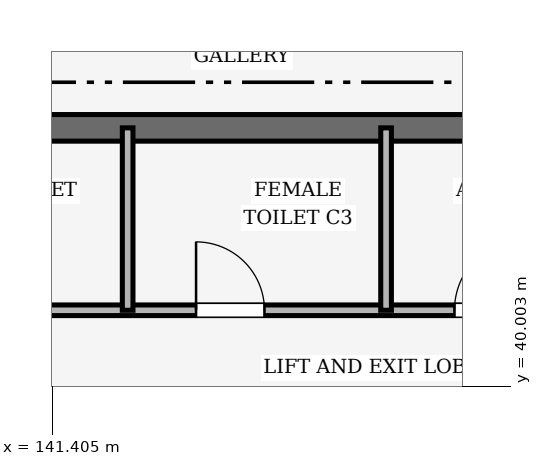
"""IFC4 building model, lengths in metres.
Left out: names, types, materials, properties, quantities, classifications, styles, units other than length and angle.
Written with IfcOpenShell. Run it as: python <this file> out.ifc"""

import sys

from ifc_helpers import new_model, si_unit, direction, frame, frame_2d, origin, place, context, subcontext, project, spatial, rectangle, extrude, element, fill, save


model = new_model("IFC4")
c1 = context("Model", 3, precision=1e-05, world=origin(), true_north=direction((0.0, 1.0)))
c2 = subcontext(c1, "Body", "Model", "MODEL_VIEW")
j1 = project(units=[si_unit("LENGTHUNIT", "METRE"), si_unit("PLANEANGLEUNIT", "RADIAN")], contexts=[c1])
p1 = place(None, origin())
s1 = spatial("IfcSite", under=j1, at=p1, CompositionType="ELEMENT")
p2 = place(p1, origin())
s2 = spatial("IfcBuilding", under=s1, at=p2, CompositionType="ELEMENT")
p3 = place(p2, origin())
s3 = spatial("IfcBuildingStorey", under=s2, at=p3, CompositionType="ELEMENT", Elevation=0.0)
p4 = place(p3, frame((149.2, 43.4, 0.0), z_axis=(0.0, 0.0, 1.0), x_axis=(-1.0, 0.0, 0.0)))
e1 = element("IfcWall", 1, at=p4, inside=s3, PredefinedType="SHEAR", context=c2, shape_type="SweptSolid", body=[
    extrude(rectangle(XDim=10.2, YDim=0.35, at=frame_2d((5.1, 0.0))), origin(), (0.0, 0.0, 1.0), 5.4),
])
p5 = place(p3, frame((139.0, 41.0, 0.0), z_axis=(0.0, 0.0, 1.0), x_axis=(1.0, 0.0, 0.0)))
e2 = element("IfcWall", 2, at=p5, inside=s3, PredefinedType="PARTITIONING", context=c2, shape_type="SweptSolid", body=[
    extrude(rectangle(XDim=10.2, YDim=0.14, at=frame_2d((5.1, 0.0))), origin(), (0.0, 0.0, 1.0), 4.5),
])
p6 = place(p5, frame((0.9, 0.0, 0.0)))
e3 = element("IfcOpeningElement", 3, at=p6, cuts=e2, PredefinedType="OPENING", context=c2, shape_type="SweptSolid", body=[
    extrude(rectangle(XDim=0.9, YDim=2.1, at=frame_2d((0.45, 1.05))), frame((0.0, 0.08, 0.0), z_axis=(0.0, -1.0, 0.0), x_axis=(1.0, 0.0, 0.0)), (0.0, 0.0, 1.0), 0.16),
])
p7 = place(p5, frame((4.3, 0.0, 0.0)))
e4 = element("IfcOpeningElement", 4, at=p7, cuts=e2, PredefinedType="OPENING", context=c2, shape_type="SweptSolid", body=[
    extrude(rectangle(XDim=0.9, YDim=2.1, at=frame_2d((0.45, 1.05))), frame((0.0, 0.08, 0.0), z_axis=(0.0, -1.0, 0.0), x_axis=(1.0, 0.0, 0.0)), (0.0, 0.0, 1.0), 0.16),
])
p8 = place(p5, frame((7.7, 0.0, 0.0)))
e5 = element("IfcOpeningElement", 5, at=p8, cuts=e2, PredefinedType="OPENING", context=c2, shape_type="SweptSolid", body=[
    extrude(rectangle(XDim=0.95, YDim=2.1, at=frame_2d((0.475, 1.05))), frame((0.0, 0.08, 0.0), z_axis=(0.0, -1.0, 0.0), x_axis=(1.0, 0.0, 0.0)), (0.0, 0.0, 1.0), 0.16),
])
for number, where, z_axis, x_axis in (
    (6, (142.4, 41.0, 0.0), (0.0, 0.0, 1.0), (0.0, 1.0, 0.0)),
    (7, (145.8, 41.0, 0.0), (0.0, 0.0, 1.0), (0.0, 1.0, 0.0)),
):
    element("IfcWall", number, at=place(p3, frame(where, z_axis=z_axis, x_axis=x_axis)), inside=s3, PredefinedType="PARTITIONING", context=c2, shape_type="SweptSolid", body=[
        extrude(rectangle(XDim=2.4, YDim=0.14, at=frame_2d((1.2, 0.0))), origin(), (0.0, 0.0, 1.0), 4.5),
    ])
p9 = place(p7, origin())
e8 = element("IfcDoor", 8, at=p9, inside=s3, OperationType="SINGLE_SWING_LEFT", PredefinedType="DOOR", context=c2, shape_type="SweptSolid", body=[
    extrude(rectangle(XDim=0.9, YDim=2.1, at=frame_2d((0.45, 1.05))), frame((0.0, 0.025, 0.0), z_axis=(0.0, -1.0, 0.0), x_axis=(1.0, 0.0, 0.0)), (0.0, 0.0, 1.0), 0.05),
])
fill(e4, e8)
p10 = place(p8, origin())
e9 = element("IfcDoor", 9, at=p10, inside=s3, OperationType="SINGLE_SWING_RIGHT", PredefinedType="DOOR", context=c2, shape_type="SweptSolid", body=[
    extrude(rectangle(XDim=0.95, YDim=2.1, at=frame_2d((0.475, 1.05))), frame((0.0, 0.025, 0.0), z_axis=(0.0, -1.0, 0.0), x_axis=(1.0, 0.0, 0.0)), (0.0, 0.0, 1.0), 0.05),
])
fill(e5, e9)
save(model, sys.argv[1])
